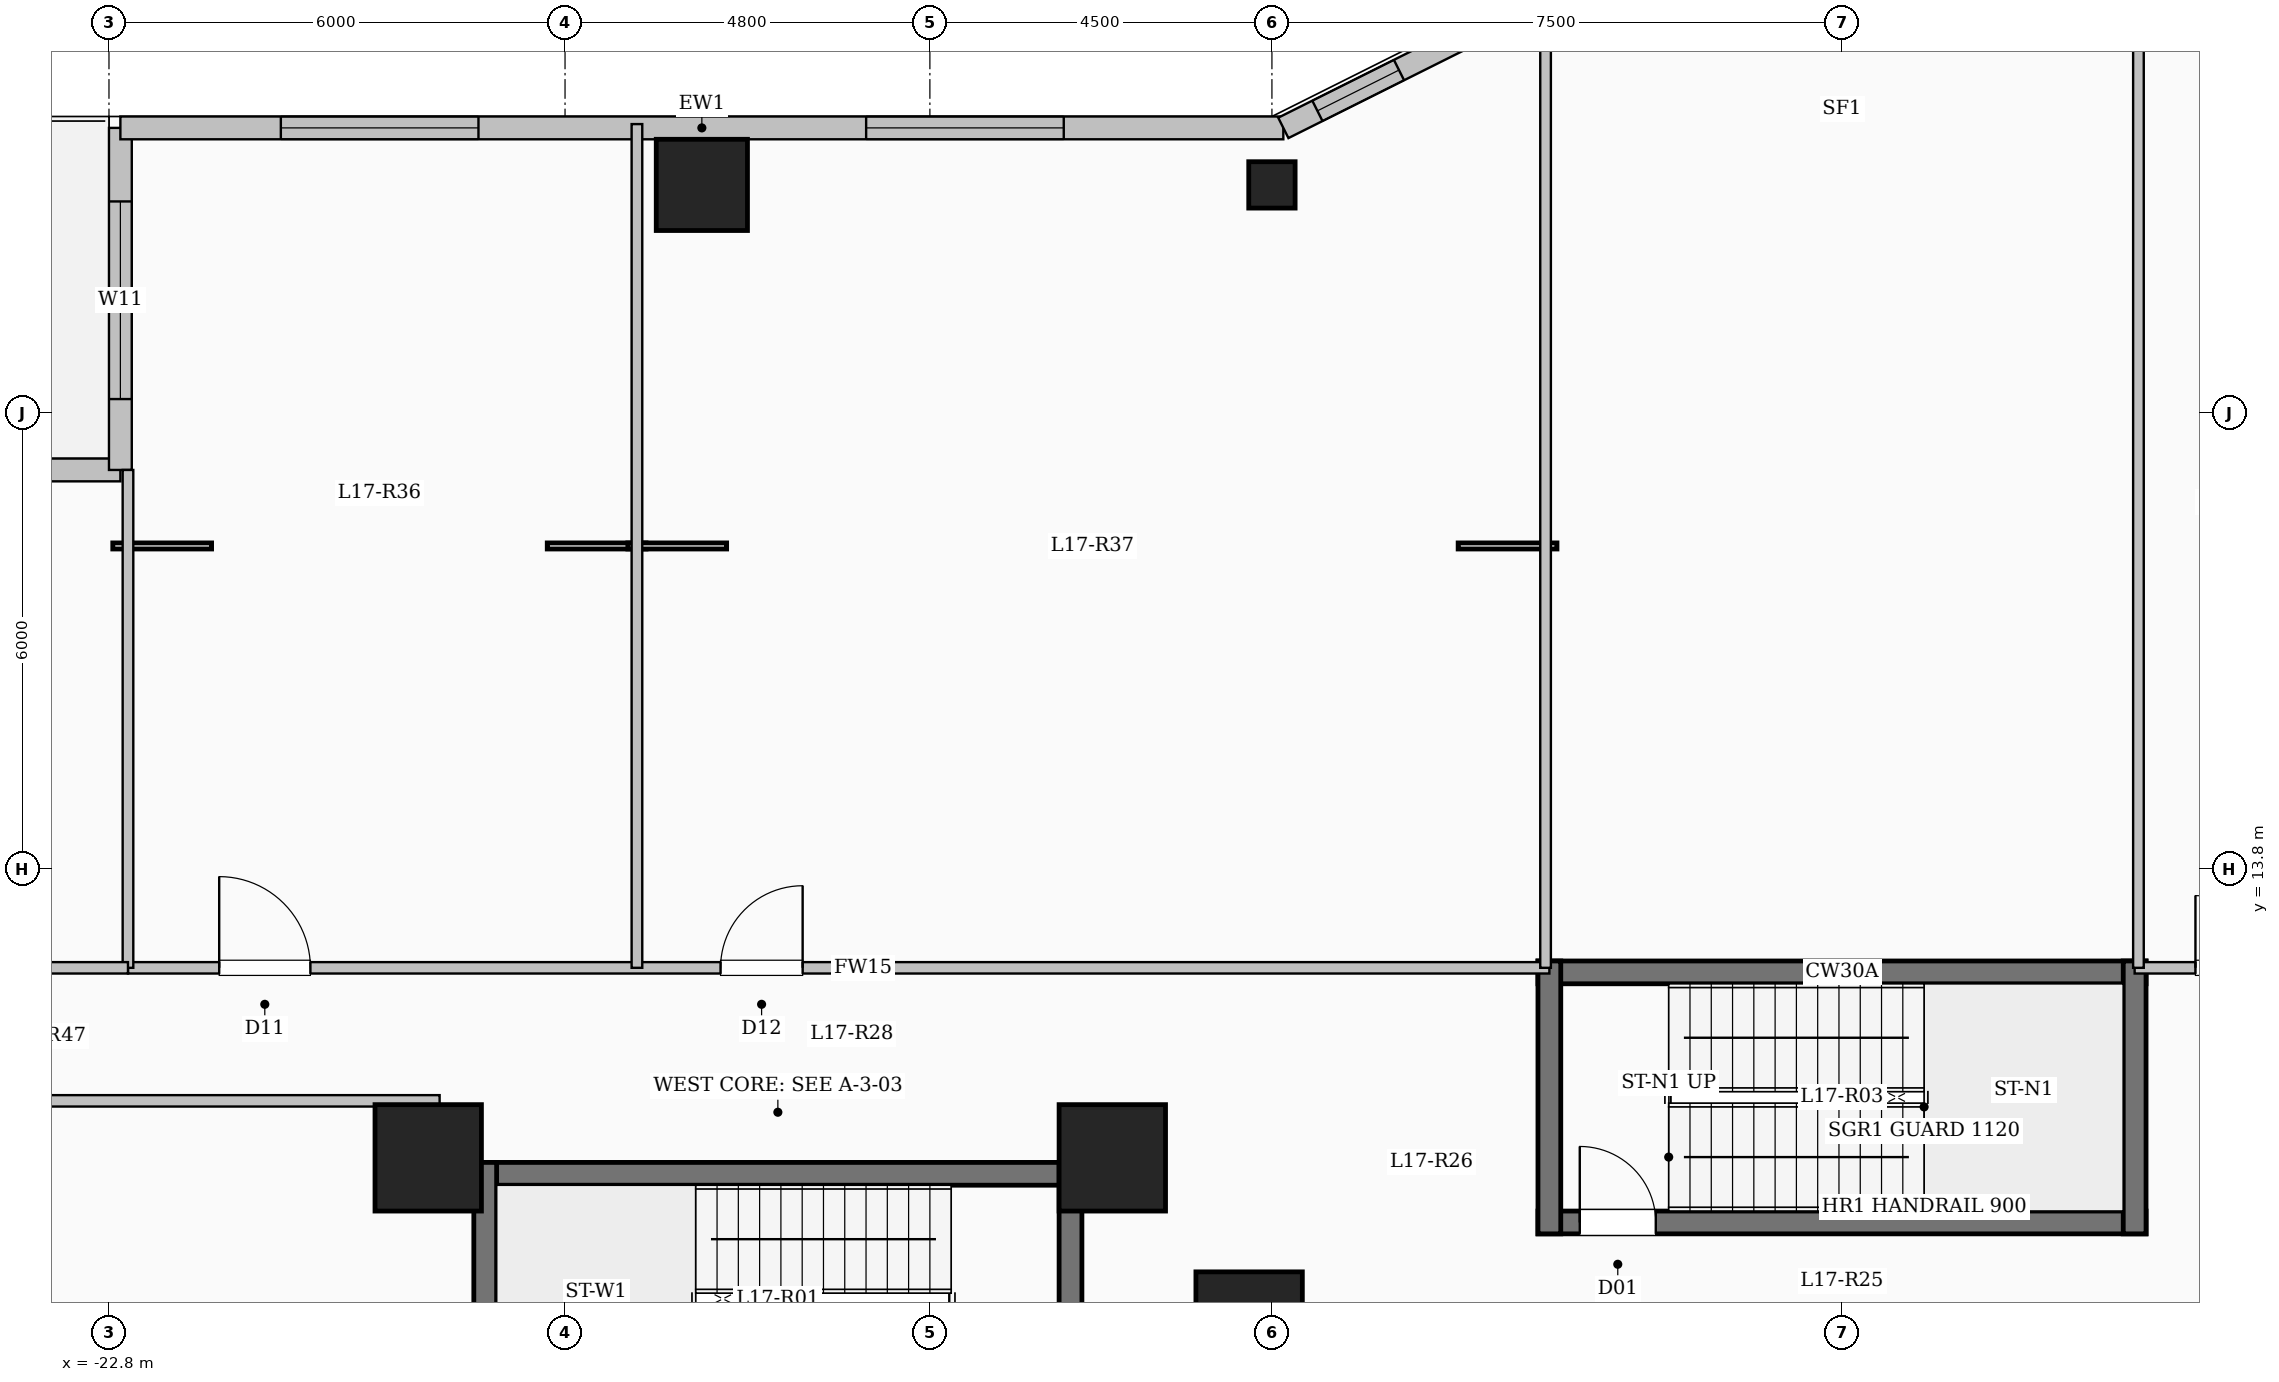
"""IFC4 building model, lengths in metres.
Left out: names, types, materials, properties, quantities, classifications, styles, units other than length and angle.
Written with IfcOpenShell. Run it as: python <this file> out.ifc"""

import sys

from ifc_helpers import new_model, si_unit, direction, frame, frame_2d, origin, origin_2d, place, context, subcontext, project, spatial, rectangle, hollow_circle, extrude, element, fill, save


model = new_model("IFC4")
c1 = context("Model", 3, precision=1e-05, world=origin(), true_north=direction((0.0, 1.0)))
c2 = subcontext(c1, "Body", "Model", "MODEL_VIEW")
j1 = project(units=[si_unit("LENGTHUNIT", "METRE"), si_unit("PLANEANGLEUNIT", "RADIAN")], contexts=[c1])
p1 = place(None, origin())
s1 = spatial("IfcSite", under=j1, at=p1, CompositionType="ELEMENT")
p2 = place(p1, origin())
s2 = spatial("IfcBuilding", under=s1, at=p2, CompositionType="ELEMENT")
p3 = place(p2, frame((0.0, 0.0, 64.2)))
s3 = spatial("IfcBuildingStorey", under=s2, at=p3, CompositionType="ELEMENT", Elevation=64.2)
for number, where, z_axis, x_axis in (
    (1, (-7.8, 7.8, 0.0), (0.0, 0.0, 1.0), (1.0, 0.0, 0.0)),
    (2, (-9.6, 10.0, 0.0), (0.0, 0.0, 1.0), (1.0, 0.0, 0.0)),
    (3, (-18.6, 10.0, 0.0), (0.0, 0.0, 1.0), (1.0, 0.0, 0.0)),
):
    element("IfcColumn", number, at=place(p3, frame(where, z_axis=z_axis, x_axis=x_axis)), inside=s3, PredefinedType="COLUMN", context=c2, shape_type="SweptSolid", body=[
        extrude(rectangle(XDim=1.4, YDim=1.4, at=origin_2d()), origin(), (0.0, 0.0, 1.0), 4.5),
    ])
p4 = place(p3, frame((-15.0, 22.8, 0.0), z_axis=(0.0, 0.0, 1.0), x_axis=(1.0, 0.0, 0.0)))
e4 = element("IfcColumn", 4, at=p4, inside=s3, PredefinedType="COLUMN", context=c2, shape_type="SweptSolid", body=[
    extrude(rectangle(XDim=1.2, YDim=1.2, at=origin_2d()), origin(), (0.0, 0.0, 1.0), 4.5),
])
p5 = place(p3, frame((-7.5, 22.8, 0.0), z_axis=(0.0, 0.0, 1.0), x_axis=(1.0, 0.0, 0.0)))
e5 = element("IfcColumn", 5, at=p5, inside=s3, PredefinedType="COLUMN", context=c2, shape_type="SweptSolid", body=[
    extrude(hollow_circle(Radius=0.305, WallThickness=0.025, at=origin_2d()), origin(), (0.0, 0.0, 1.0), 4.5),
])
p6 = place(p3, frame((-28.65, 19.05, 0.0), z_axis=(0.0, 0.0, 1.0), x_axis=(1.0, 0.0, 0.0)))
e6 = element("IfcWall", 6, at=p6, inside=s3, PredefinedType="SOLIDWALL", context=c2, shape_type="SweptSolid", body=[
    extrude(rectangle(XDim=6.0, YDim=0.3, at=frame_2d((3.0, 0.0))), origin(), (0.0, 0.0, 1.0), 4.2),
])
p7 = place(p6, frame((2.5, 0.0, 0.0)))
e7 = element("IfcOpeningElement", 7, at=p7, cuts=e6, PredefinedType="OPENING", context=c2, shape_type="SweptSolid", body=[
    extrude(rectangle(XDim=1.1, YDim=2.2, at=frame_2d((0.55, 1.1))), frame((0.0, 0.16, 0.0), z_axis=(0.0, -1.0, 0.0), x_axis=(1.0, 0.0, 0.0)), (0.0, 0.0, 1.0), 0.32),
])
p8 = place(p6, frame((0.755, 0.0, 0.95)))
e8 = element("IfcOpeningElement", 8, at=p8, cuts=e6, PredefinedType="OPENING", context=c2, shape_type="SweptSolid", body=[
    extrude(rectangle(XDim=1.2, YDim=1.5, at=frame_2d((0.6, 0.75))), frame((0.0, 0.16, 0.0), z_axis=(0.0, -1.0, 0.0), x_axis=(1.0, 0.0, 0.0)), (0.0, 0.0, 1.0), 0.32),
])
p9 = place(p3, frame((-22.65, 19.05, 0.0), z_axis=(0.0, 0.0, 1.0), x_axis=(0.0, 1.0, 0.0)))
e9 = element("IfcWall", 9, at=p9, inside=s3, PredefinedType="SOLIDWALL", context=c2, shape_type="SweptSolid", body=[
    extrude(rectangle(XDim=4.5, YDim=0.3, at=frame_2d((2.25, 0.0))), origin(), (0.0, 0.0, 1.0), 4.2),
])
p10 = place(p9, frame((0.933, 0.0, 0.85)))
e10 = element("IfcOpeningElement", 10, at=p10, cuts=e9, PredefinedType="OPENING", context=c2, shape_type="SweptSolid", body=[
    extrude(rectangle(XDim=2.6, YDim=2.4, at=frame_2d((1.3, 1.2))), frame((0.0, 0.16, 0.0), z_axis=(0.0, -1.0, 0.0), x_axis=(1.0, 0.0, 0.0)), (0.0, 0.0, 1.0), 0.32),
])
p11 = place(p3, frame((-22.65, 23.55, 0.0), z_axis=(0.0, 0.0, 1.0), x_axis=(1.0, 0.0, 0.0)))
e11 = element("IfcWall", 11, at=p11, inside=s3, PredefinedType="SOLIDWALL", context=c2, shape_type="SweptSolid", body=[
    extrude(rectangle(XDim=15.3, YDim=0.3, at=frame_2d((7.65, 0.0))), origin(), (0.0, 0.0, 1.0), 4.2),
])
p12 = place(p11, frame((2.111, 0.0, 0.85)))
e12 = element("IfcOpeningElement", 12, at=p12, cuts=e11, PredefinedType="OPENING", context=c2, shape_type="SweptSolid", body=[
    extrude(rectangle(XDim=2.6, YDim=2.4, at=frame_2d((1.3, 1.2))), frame((0.0, 0.16, 0.0), z_axis=(0.0, -1.0, 0.0), x_axis=(1.0, 0.0, 0.0)), (0.0, 0.0, 1.0), 0.32),
])
p13 = place(p11, frame((9.811, 0.0, 0.85)))
e13 = element("IfcOpeningElement", 13, at=p13, cuts=e11, PredefinedType="OPENING", context=c2, shape_type="SweptSolid", body=[
    extrude(rectangle(XDim=2.6, YDim=2.4, at=frame_2d((1.3, 1.2))), frame((0.0, 0.16, 0.0), z_axis=(0.0, -1.0, 0.0), x_axis=(1.0, 0.0, 0.0)), (0.0, 0.0, 1.0), 0.32),
])
p14 = place(p3, frame((-7.35, 23.55, 0.0), z_axis=(0.0, 0.0, 1.0), x_axis=(0.894427191, 0.4472135955, 0.0)))
e14 = element("IfcWall", 14, at=p14, inside=s3, PredefinedType="SOLIDWALL", context=c2, shape_type="SweptSolid", body=[
    extrude(rectangle(XDim=3.354, YDim=0.3, at=frame_2d((1.677, 0.0))), origin(), (0.0, 0.0, 1.0), 4.2),
])
p15 = place(p14, frame((0.501, 0.0, 0.95)))
e15 = element("IfcOpeningElement", 15, at=p15, cuts=e14, PredefinedType="OPENING", context=c2, shape_type="SweptSolid", body=[
    extrude(rectangle(XDim=1.2, YDim=1.5, at=frame_2d((0.6, 0.75))), frame((0.0, 0.16, 0.0), z_axis=(0.0, -1.0, 0.0), x_axis=(1.0, 0.0, 0.0)), (0.0, 0.0, 1.0), 0.32),
])
p16 = place(p3, frame((4.35, 25.05, 0.0), z_axis=(0.0, 0.0, 1.0), x_axis=(0.894427191, -0.4472135955, 0.0)))
e16 = element("IfcWall", 16, at=p16, inside=s3, PredefinedType="SOLIDWALL", context=c2, shape_type="SweptSolid", body=[
    extrude(rectangle(XDim=3.354, YDim=0.3, at=frame_2d((1.677, 0.0))), origin(), (0.0, 0.0, 1.0), 4.2),
])
p17 = place(p3, frame((-18.0, 9.79, 0.0), z_axis=(0.0, 0.0, 1.0), x_axis=(1.0, 0.0, 0.0)))
e17 = element("IfcWall", 17, at=p17, inside=s3, PredefinedType="SHEAR", context=c2, shape_type="SweptSolid", body=[
    extrude(rectangle(XDim=8.0, YDim=0.3, at=frame_2d((4.0, 0.0))), origin(), (0.0, 0.0, 1.0), 4.5),
])
for number, where, z_axis, x_axis in (
    (18, (-17.85, 6.35, 0.0), (0.0, 0.0, 1.0), (0.0, 1.0, 0.0)),
    (19, (-10.15, 6.35, 0.0), (0.0, 0.0, 1.0), (0.0, 1.0, 0.0)),
):
    element("IfcWall", number, at=place(p3, frame(where, z_axis=z_axis, x_axis=x_axis)), inside=s3, PredefinedType="SHEAR", context=c2, shape_type="SweptSolid", body=[
        extrude(rectangle(XDim=3.59, YDim=0.3, at=frame_2d((1.795, 0.0))), origin(), (0.0, 0.0, 1.0), 4.5),
    ])
p18 = place(p3, frame((-4.0, 12.44, 0.0), z_axis=(0.0, 0.0, 1.0), x_axis=(1.0, 0.0, 0.0)))
e20 = element("IfcWall", 20, at=p18, inside=s3, PredefinedType="SHEAR", context=c2, shape_type="SweptSolid", body=[
    extrude(rectangle(XDim=8.0, YDim=0.3, at=frame_2d((4.0, 0.0))), origin(), (0.0, 0.0, 1.0), 4.5),
])
p19 = place(p3, frame((-4.0, 9.15, 0.0), z_axis=(0.0, 0.0, 1.0), x_axis=(1.0, 0.0, 0.0)))
e21 = element("IfcWall", 21, at=p19, inside=s3, PredefinedType="SHEAR", context=c2, shape_type="SweptSolid", body=[
    extrude(rectangle(XDim=8.0, YDim=0.3, at=frame_2d((4.0, 0.0))), origin(), (0.0, 0.0, 1.0), 4.5),
])
p20 = place(p19, frame((0.55, 0.0, 0.0)))
e22 = element("IfcOpeningElement", 22, at=p20, cuts=e21, PredefinedType="OPENING", context=c2, shape_type="SweptSolid", body=[
    extrude(rectangle(XDim=1.0, YDim=2.15, at=frame_2d((0.5, 1.075))), frame((0.0, 0.16, 0.0), z_axis=(0.0, -1.0, 0.0), x_axis=(1.0, 0.0, 0.0)), (0.0, 0.0, 1.0), 0.32),
])
for number, where, z_axis, x_axis in (
    (23, (-3.85, 9.0, 0.0), (0.0, 0.0, 1.0), (0.0, 1.0, 0.0)),
    (24, (3.85, 9.0, 0.0), (0.0, 0.0, 1.0), (0.0, 1.0, 0.0)),
):
    element("IfcWall", number, at=place(p3, frame(where, z_axis=z_axis, x_axis=x_axis)), inside=s3, PredefinedType="SHEAR", context=c2, shape_type="SweptSolid", body=[
        extrude(rectangle(XDim=3.59, YDim=0.3, at=frame_2d((1.795, 0.0))), origin(), (0.0, 0.0, 1.0), 4.5),
    ])
p21 = place(p3, frame((-22.55, 12.5, 0.0), z_axis=(0.0, 0.0, 1.0), x_axis=(1.0, 0.0, 0.0)))
e25 = element("IfcWall", 25, at=p21, inside=s3, PredefinedType="PARTITIONING", context=c2, shape_type="SweptSolid", body=[
    extrude(rectangle(XDim=18.7, YDim=0.15, at=frame_2d((9.35, 0.0))), origin(), (0.0, 0.0, 1.0), 4.2),
])
p22 = place(p21, frame((1.2, 0.0, 0.0)))
e26 = element("IfcOpeningElement", 26, at=p22, cuts=e25, PredefinedType="OPENING", context=c2, shape_type="SweptSolid", body=[
    extrude(rectangle(XDim=1.2, YDim=2.15, at=frame_2d((0.6, 1.075))), frame((0.0, 0.085, 0.0), z_axis=(0.0, -1.0, 0.0), x_axis=(1.0, 0.0, 0.0)), (0.0, 0.0, 1.0), 0.17),
])
p23 = place(p21, frame((7.796, 0.0, 0.0)))
e27 = element("IfcOpeningElement", 27, at=p23, cuts=e25, PredefinedType="OPENING", context=c2, shape_type="SweptSolid", body=[
    extrude(rectangle(XDim=1.08, YDim=2.15, at=frame_2d((0.54, 1.075))), frame((0.0, 0.085, 0.0), z_axis=(0.0, -1.0, 0.0), x_axis=(1.0, 0.0, 0.0)), (0.0, 0.0, 1.0), 0.17),
])
p24 = place(p3, frame((3.85, 12.5, 0.0), z_axis=(0.0, 0.0, 1.0), x_axis=(1.0, 0.0, 0.0)))
e28 = element("IfcWall", 28, at=p24, inside=s3, PredefinedType="PARTITIONING", context=c2, shape_type="SweptSolid", body=[
    extrude(rectangle(XDim=18.7, YDim=0.15, at=frame_2d((9.35, 0.0))), origin(), (0.0, 0.0, 1.0), 4.2),
])
p25 = place(p24, frame((0.8, 0.0, 0.0)))
e29 = element("IfcOpeningElement", 29, at=p25, cuts=e28, PredefinedType="OPENING", context=c2, shape_type="SweptSolid", body=[
    extrude(rectangle(XDim=0.95, YDim=2.15, at=frame_2d((0.475, 1.075))), frame((0.0, 0.085, 0.0), z_axis=(0.0, -1.0, 0.0), x_axis=(1.0, 0.0, 0.0)), (0.0, 0.0, 1.0), 0.17),
])
p26 = place(p24, frame((3.6, 0.0, 0.0)))
e30 = element("IfcOpeningElement", 30, at=p26, cuts=e28, PredefinedType="OPENING", context=c2, shape_type="SweptSolid", body=[
    extrude(rectangle(XDim=0.95, YDim=2.15, at=frame_2d((0.475, 1.075))), frame((0.0, 0.085, 0.0), z_axis=(0.0, -1.0, 0.0), x_axis=(1.0, 0.0, 0.0)), (0.0, 0.0, 1.0), 0.17),
])
p27 = place(p24, frame((6.55, 0.0, 0.0)))
e31 = element("IfcOpeningElement", 31, at=p27, cuts=e28, PredefinedType="OPENING", context=c2, shape_type="SweptSolid", body=[
    extrude(rectangle(XDim=1.08, YDim=2.15, at=frame_2d((0.54, 1.075))), frame((0.0, 0.085, 0.0), z_axis=(0.0, -1.0, 0.0), x_axis=(1.0, 0.0, 0.0)), (0.0, 0.0, 1.0), 0.17),
])
p28 = place(p24, frame((11.317, 0.0, 0.0)))
e32 = element("IfcOpeningElement", 32, at=p28, cuts=e28, PredefinedType="OPENING", context=c2, shape_type="SweptSolid", body=[
    extrude(rectangle(XDim=1.2, YDim=2.15, at=frame_2d((0.6, 1.075))), frame((0.0, 0.085, 0.0), z_axis=(0.0, -1.0, 0.0), x_axis=(1.0, 0.0, 0.0)), (0.0, 0.0, 1.0), 0.17),
])
for number, where, z_axis, x_axis in (
    (33, (-3.9, 12.5, 0.0), (0.0, 0.0, 1.0), (0.0, 1.0, 0.0)),
    (34, (3.9, 12.5, 0.0), (0.0, 0.0, 1.0), (0.0, 1.0, 0.0)),
):
    element("IfcWall", number, at=place(p3, frame(where, z_axis=z_axis, x_axis=x_axis)), inside=s3, PredefinedType="PARTITIONING", context=c2, shape_type="SweptSolid", body=[
        extrude(rectangle(XDim=12.58, YDim=0.14, at=frame_2d((6.29, 0.0))), origin(), (0.0, 0.0, 1.0), 4.2),
    ])
p29 = place(p3, frame((-15.854, 12.5, 0.0), z_axis=(0.0, 0.0, 1.0), x_axis=(0.0, 1.0, 0.0)))
e35 = element("IfcWall", 35, at=p29, inside=s3, PredefinedType="PARTITIONING", context=c2, shape_type="SweptSolid", body=[
    extrude(rectangle(XDim=11.1, YDim=0.14, at=frame_2d((5.55, 0.0))), origin(), (0.0, 0.0, 1.0), 4.2),
])
p30 = place(p3, frame((-28.68, 10.75, 0.0), z_axis=(0.0, 0.0, 1.0), x_axis=(1.0, 0.0, 0.0)))
e36 = element("IfcWall", 36, at=p30, inside=s3, PredefinedType="PARTITIONING", context=c2, shape_type="SweptSolid", body=[
    extrude(rectangle(XDim=10.23, YDim=0.15, at=frame_2d((5.115, 0.0))), origin(), (0.0, 0.0, 1.0), 4.2),
])
p31 = place(p3, frame((-22.55, 12.5, 0.0), z_axis=(0.0, 0.0, 1.0), x_axis=(0.0, 1.0, 0.0)))
e37 = element("IfcWall", 37, at=p31, inside=s3, PredefinedType="PARTITIONING", context=c2, shape_type="SweptSolid", body=[
    extrude(rectangle(XDim=6.55, YDim=0.14, at=frame_2d((3.275, 0.0))), origin(), (0.0, 0.0, 1.0), 4.2),
])
p32 = place(p3, frame((-28.68, 12.5, 0.0), z_axis=(0.0, 0.0, 1.0), x_axis=(1.0, 0.0, 0.0)))
e38 = element("IfcWall", 38, at=p32, inside=s3, PredefinedType="PARTITIONING", context=c2, shape_type="SweptSolid", body=[
    extrude(rectangle(XDim=6.13, YDim=0.15, at=frame_2d((3.065, 0.0))), origin(), (0.0, 0.0, 1.0), 4.2),
])
p33 = place(p32, frame((2.59, 0.0, 0.0)))
e39 = element("IfcOpeningElement", 39, at=p33, cuts=e38, PredefinedType="OPENING", context=c2, shape_type="SweptSolid", body=[
    extrude(rectangle(XDim=0.95, YDim=2.15, at=frame_2d((0.475, 1.075))), frame((0.0, 0.085, 0.0), z_axis=(0.0, -1.0, 0.0), x_axis=(1.0, 0.0, 0.0)), (0.0, 0.0, 1.0), 0.17),
])
p34 = place(p10, origin())
e40 = element("IfcWindow", 40, at=p34, inside=s3, PartitioningType="SINGLE_PANEL", PredefinedType="WINDOW", context=c2, shape_type="SweptSolid", body=[
    extrude(rectangle(XDim=2.6, YDim=2.4, at=frame_2d((1.3, 1.2))), frame((0.0, 0.03, 0.0), z_axis=(0.0, -1.0, 0.0), x_axis=(1.0, 0.0, 0.0)), (0.0, 0.0, 1.0), 0.06),
])
fill(e10, e40)
p35 = place(p12, origin())
e41 = element("IfcWindow", 41, at=p35, inside=s3, PartitioningType="SINGLE_PANEL", PredefinedType="WINDOW", context=c2, shape_type="SweptSolid", body=[
    extrude(rectangle(XDim=2.6, YDim=2.4, at=frame_2d((1.3, 1.2))), frame((0.0, 0.03, 0.0), z_axis=(0.0, -1.0, 0.0), x_axis=(1.0, 0.0, 0.0)), (0.0, 0.0, 1.0), 0.06),
])
fill(e12, e41)
p36 = place(p13, origin())
e42 = element("IfcWindow", 42, at=p36, inside=s3, PartitioningType="SINGLE_PANEL", PredefinedType="WINDOW", context=c2, shape_type="SweptSolid", body=[
    extrude(rectangle(XDim=2.6, YDim=2.4, at=frame_2d((1.3, 1.2))), frame((0.0, 0.03, 0.0), z_axis=(0.0, -1.0, 0.0), x_axis=(1.0, 0.0, 0.0)), (0.0, 0.0, 1.0), 0.06),
])
fill(e13, e42)
p37 = place(p15, origin())
e43 = element("IfcWindow", 43, at=p37, inside=s3, PartitioningType="SINGLE_PANEL", PredefinedType="WINDOW", context=c2, shape_type="SweptSolid", body=[
    extrude(rectangle(XDim=1.2, YDim=1.5, at=frame_2d((0.6, 0.75))), frame((0.0, 0.03, 0.0), z_axis=(0.0, -1.0, 0.0), x_axis=(1.0, 0.0, 0.0)), (0.0, 0.0, 1.0), 0.06),
])
fill(e15, e43)
p38 = place(p20, origin())
e44 = element("IfcDoor", 44, at=p38, inside=s3, OperationType="SINGLE_SWING_LEFT", PredefinedType="DOOR", context=c2, shape_type="SweptSolid", body=[
    extrude(rectangle(XDim=1.0, YDim=2.15, at=frame_2d((0.5, 1.075))), frame((0.0, 0.025, 0.0), z_axis=(0.0, -1.0, 0.0), x_axis=(1.0, 0.0, 0.0)), (0.0, 0.0, 1.0), 0.05),
])
fill(e22, e44)
p39 = place(p22, origin())
e45 = element("IfcDoor", 45, at=p39, inside=s3, OperationType="SINGLE_SWING_LEFT", PredefinedType="DOOR", context=c2, shape_type="SweptSolid", body=[
    extrude(rectangle(XDim=1.2, YDim=2.15, at=frame_2d((0.6, 1.075))), frame((0.0, 0.025, 0.0), z_axis=(0.0, -1.0, 0.0), x_axis=(1.0, 0.0, 0.0)), (0.0, 0.0, 1.0), 0.05),
])
fill(e26, e45)
p40 = place(p23, origin())
e46 = element("IfcDoor", 46, at=p40, inside=s3, OperationType="SINGLE_SWING_RIGHT", PredefinedType="DOOR", context=c2, shape_type="SweptSolid", body=[
    extrude(rectangle(XDim=1.08, YDim=2.15, at=frame_2d((0.54, 1.075))), frame((0.0, 0.025, 0.0), z_axis=(0.0, -1.0, 0.0), x_axis=(1.0, 0.0, 0.0)), (0.0, 0.0, 1.0), 0.05),
])
fill(e27, e46)
p41 = place(p25, origin())
e47 = element("IfcDoor", 47, at=p41, inside=s3, OperationType="SINGLE_SWING_LEFT", PredefinedType="DOOR", context=c2, shape_type="SweptSolid", body=[
    extrude(rectangle(XDim=0.95, YDim=2.15, at=frame_2d((0.475, 1.075))), frame((0.0, 0.025, 0.0), z_axis=(0.0, -1.0, 0.0), x_axis=(1.0, 0.0, 0.0)), (0.0, 0.0, 1.0), 0.05),
])
fill(e29, e47)
save(model, sys.argv[1])
